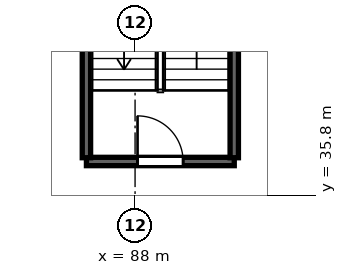
"""IFC4 building model, lengths in metres.
Left out: names, types, materials, properties, quantities, classifications, styles, units other than length and angle.
Written with IfcOpenShell. Run it as: python <this file> out.ifc"""

import sys

from ifc_helpers import new_model, si_unit, direction, frame, frame_2d, origin, place, context, subcontext, project, spatial, rectangle, extrude, source, transform, mapped, element, fill, save


model = new_model("IFC4")
c1 = context("Model", 3, precision=1e-05, world=origin(), true_north=direction((0.0, 1.0)))
c2 = subcontext(c1, "Body", "Model", "MODEL_VIEW")
j1 = project(units=[si_unit("LENGTHUNIT", "METRE"), si_unit("PLANEANGLEUNIT", "RADIAN")], contexts=[c1])
p1 = place(None, origin())
s1 = spatial("IfcSite", under=j1, at=p1, CompositionType="ELEMENT")
p2 = place(p1, origin())
s2 = spatial("IfcBuilding", under=s1, at=p2, CompositionType="ELEMENT")
p3 = place(p2, frame((0.0, 0.0, -5.0)))
s3 = spatial("IfcBuildingStorey", under=s2, at=p3, CompositionType="ELEMENT", Elevation=-5.0)
m1 = source(origin(), c2, "Body", "SweptSolid", [
    extrude(rectangle(XDim=3.89, YDim=0.22, at=frame_2d((1.945, 0.0))), origin(), (0.0, 0.0, 1.0), 5.0),
])
p4 = place(p3, frame((86.72, 36.69, 0.0), z_axis=(0.0, 0.0, 1.0), x_axis=(1.0, 0.0, 0.0)))
e1 = element("IfcWall", 1, at=p4, inside=s3, PredefinedType="SOLIDWALL", context=c2, shape_type="MappedRepresentation", body=[
    mapped(m1, transform((0.0, 0.0, 0.0), scale=1.0)),
])
p5 = place(p4, frame((1.345, 0.0, 0.0)))
e2 = element("IfcOpeningElement", 2, at=p5, cuts=e1, PredefinedType="OPENING", context=c2, shape_type="SweptSolid", body=[
    extrude(rectangle(XDim=1.2, YDim=2.15, at=frame_2d((0.6, 1.075))), frame((0.0, 0.12, 0.0), z_axis=(0.0, -1.0, 0.0), x_axis=(1.0, 0.0, 0.0)), (0.0, 0.0, 1.0), 0.24),
])
m2 = source(origin(), c2, "Body", "SweptSolid", [
    extrude(rectangle(XDim=10.422, YDim=0.22, at=frame_2d((5.211, 0.0))), origin(), (0.0, 0.0, 1.0), 5.0),
])
for number, where, z_axis, x_axis in (
    (3, (86.72, 36.789, 0.0), (0.0, 0.0, 1.0), (0.0, 1.0, 0.0)),
    (4, (90.61, 36.789, 0.0), (0.0, 0.0, 1.0), (0.0, 1.0, 0.0)),
):
    element("IfcWall", number, at=place(p3, frame(where, z_axis=z_axis, x_axis=x_axis)), inside=s3, PredefinedType="SOLIDWALL", context=c2, shape_type="MappedRepresentation", body=[
        mapped(m2, transform((0.0, 0.0, 0.0), scale=1.0)),
    ])
m3 = source(origin(), c2, "Body", "SweptSolid", [
    extrude(rectangle(XDim=1.2, YDim=2.15, at=frame_2d((0.6, 1.075))), frame((0.0, 0.025, 0.0), z_axis=(0.0, -1.0, 0.0), x_axis=(1.0, 0.0, 0.0)), (0.0, 0.0, 1.0), 0.05),
])
p6 = place(p5, origin())
e5 = element("IfcDoor", 5, at=p6, inside=s3, OperationType="SINGLE_SWING_LEFT", PredefinedType="DOOR", context=c2, shape_type="MappedRepresentation", body=[
    mapped(m3, transform((0.0, 0.0, 0.0), scale=1.0)),
])
fill(e2, e5)
save(model, sys.argv[1])
